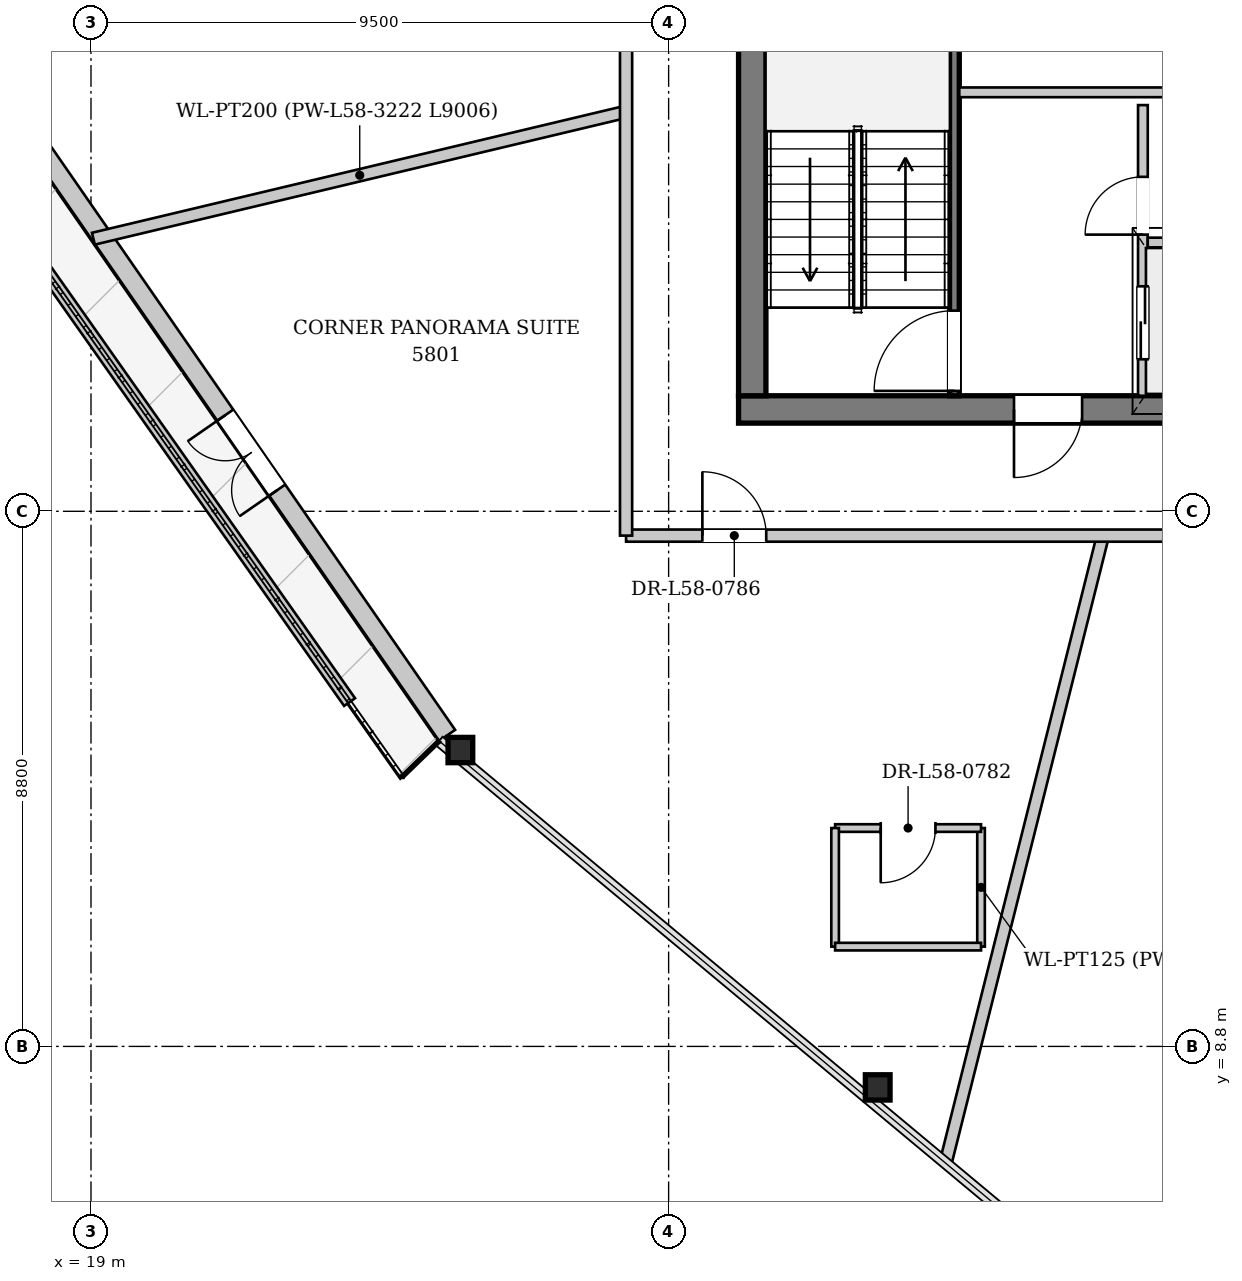
"""IFC4 building model, lengths in metres.
Left out: names, types, materials, properties, quantities, classifications, styles, units other than length and angle.
Written with IfcOpenShell. Run it as: python <this file> out.ifc"""

import sys

from ifc_helpers import new_model, si_unit, direction, frame, frame_2d, origin, origin_2d, place, context, subcontext, project, spatial, rectangle, i_section, extrude, source, transform, mapped, element, fill, save


model = new_model("IFC4")
c1 = context("Model", 3, precision=1e-05, world=origin(), true_north=direction((0.0, 1.0)))
c2 = subcontext(c1, "Body", "Model", "MODEL_VIEW")
j1 = project(units=[si_unit("LENGTHUNIT", "METRE"), si_unit("PLANEANGLEUNIT", "RADIAN")], contexts=[c1])
p1 = place(None, origin())
s1 = spatial("IfcSite", under=j1, at=p1, CompositionType="ELEMENT")
p2 = place(p1, origin())
s2 = spatial("IfcBuilding", under=s1, at=p2, CompositionType="ELEMENT")
p3 = place(p2, frame((0.0, 0.0, 220.25)))
s3 = spatial("IfcBuildingStorey", under=s2, at=p3, CompositionType="ELEMENT", Elevation=220.25)
m1 = source(origin(), c2, "Body", "SweptSolid", [
    extrude(i_section(OverallWidth=0.406, OverallDepth=0.416, WebThickness=0.027, FlangeThickness=0.042, at=origin_2d()), origin(), (0.0, 0.0, 1.0), 3.469),
])
p4 = place(p3, frame((24.726, 13.823, 0.0), z_axis=(0.201474528412, -0.086064739172, 0.975705321843), x_axis=(0.392833572911, 0.919609582374, 0.0)))
e1 = element("IfcColumn", 1, at=p4, inside=s3, PredefinedType="COLUMN", context=c2, shape_type="MappedRepresentation", body=[
    mapped(m1, transform((0.0, 0.0, 0.0), x_axis=(1.0, 0.0, 0.0), y_axis=(0.0, 1.0, 0.0), z_axis=(0.0, 0.0, 1.0), scale=1.0)),
])
m2 = source(origin(), c2, "Body", "SweptSolid", [
    extrude(i_section(OverallWidth=0.406, OverallDepth=0.416, WebThickness=0.027, FlangeThickness=0.042, at=origin_2d()), origin(), (0.0, 0.0, 1.0), 3.49),
])
p5 = place(p3, frame((31.515, 8.164, 0.0), z_axis=(0.242527231029, -0.021825352201, 0.96989906496), x_axis=(0.089629150551, 0.995975208211, 0.0)))
e2 = element("IfcColumn", 2, at=p5, inside=s3, PredefinedType="COLUMN", context=c2, shape_type="MappedRepresentation", body=[
    mapped(m2, transform((0.0, 0.0, 0.0), x_axis=(1.0, 0.0, 0.0), y_axis=(0.0, 1.0, 0.0), z_axis=(0.0, 0.0, 1.0), scale=1.0)),
])
p6 = place(p3, frame((24.857, 13.914, 0.0), z_axis=(0.0, 0.0, 1.0), x_axis=(-0.569497917595, 0.821992774819, 0.0)))
e3 = element("IfcWall", 3, at=p6, inside=s3, PredefinedType="SOLIDWALL", context=c2, shape_type="SweptSolid", body=[
    extrude(rectangle(XDim=17.678, YDim=0.32, at=frame_2d((8.839, 0.0))), origin(), (0.0, 0.0, 1.0), 2.822),
])
p7 = place(p6, frame((4.907, 0.0, 0.0)))
e4 = element("IfcOpeningElement", 4, at=p7, cuts=e3, PredefinedType="OPENING", context=c2, shape_type="SweptSolid", body=[
    extrude(rectangle(XDim=1.5, YDim=2.3, at=frame_2d((0.75, 1.15))), frame((0.0, 0.17, 0.0), z_axis=(0.0, -1.0, 0.0), x_axis=(1.0, 0.0, 0.0)), (0.0, 0.0, 1.0), 0.34),
])
p8 = place(p6, frame((11.782, 0.0, 0.352)))
e5 = element("IfcOpeningElement", 5, at=p8, cuts=e3, PredefinedType="OPENING", context=c2, shape_type="SweptSolid", body=[
    extrude(rectangle(XDim=2.6, YDim=2.35, at=frame_2d((1.3, 1.175))), frame((0.0, 0.17, 0.0), z_axis=(0.0, -1.0, 0.0), x_axis=(1.0, 0.0, 0.0)), (0.0, 0.0, 1.0), 0.34),
])
p9 = place(p3, frame((14.164, 27.359, 0.0), z_axis=(0.0, 0.0, 1.0), x_axis=(0.576040252734, -0.817421327854, 0.0)))
e6 = element("IfcWall", 6, at=p9, inside=s3, PredefinedType="PARAPET", context=c2, shape_type="SweptSolid", body=[
    extrude(rectangle(XDim=15.777, YDim=0.22, at=frame_2d((7.889, 0.0))), origin(), (0.0, 0.0, 1.0), 0.3),
])
p10 = place(p3, frame((46.35, 19.275, 0.0), z_axis=(0.0, 0.0, 1.0), x_axis=(-1.0, 0.0, 0.0)))
e7 = element("IfcWall", 7, at=p10, inside=s3, PredefinedType="SHEAR", context=c2, shape_type="SweptSolid", body=[
    extrude(rectangle(XDim=16.7, YDim=0.45, at=frame_2d((8.35, 0.0))), origin(), (0.0, 0.0, 1.0), 3.33),
])
p11 = place(p10, frame((4.55, 0.0, 0.0)))
e8 = element("IfcOpeningElement", 8, at=p11, cuts=e7, PredefinedType="OPENING", context=c2, shape_type="SweptSolid", body=[
    extrude(rectangle(XDim=1.12, YDim=2.25, at=frame_2d((0.56, 1.125))), frame((0.0, 0.235, 0.0), z_axis=(0.0, -1.0, 0.0), x_axis=(1.0, 0.0, 0.0)), (0.0, 0.0, 1.0), 0.47),
])
p12 = place(p10, frame((11.05, 0.0, 0.0)))
e9 = element("IfcOpeningElement", 9, at=p12, cuts=e7, PredefinedType="OPENING", context=c2, shape_type="SweptSolid", body=[
    extrude(rectangle(XDim=1.12, YDim=2.25, at=frame_2d((0.56, 1.125))), frame((0.0, 0.235, 0.0), z_axis=(0.0, -1.0, 0.0), x_axis=(1.0, 0.0, 0.0)), (0.0, 0.0, 1.0), 0.47),
])
p13 = place(p3, frame((29.875, 19.5, 0.0), z_axis=(0.0, 0.0, 1.0), x_axis=(0.0, 1.0, 0.0)))
e10 = element("IfcWall", 10, at=p13, inside=s3, PredefinedType="SHEAR", context=c2, shape_type="SweptSolid", body=[
    extrude(rectangle(XDim=14.2, YDim=0.45, at=frame_2d((7.1, 0.0))), origin(), (0.0, 0.0, 1.0), 3.33),
])
p14 = place(p13, frame((7.42, 0.0, 0.0)))
e11 = element("IfcOpeningElement", 11, at=p14, cuts=e10, PredefinedType="OPENING", context=c2, shape_type="SweptSolid", body=[
    extrude(rectangle(XDim=1.6, YDim=2.2, at=frame_2d((0.8, 1.1))), frame((0.0, 0.235, 0.0), z_axis=(0.0, -1.0, 0.0), x_axis=(1.0, 0.0, 0.0)), (0.0, 0.0, 1.0), 0.47),
])
p15 = place(p3, frame((33.2, 19.5, 0.0), z_axis=(0.0, 0.0, 1.0), x_axis=(0.0, 1.0, 0.0)))
e12 = element("IfcWall", 12, at=p15, inside=s3, PredefinedType="PARTITIONING", context=c2, shape_type="SweptSolid", body=[
    extrude(rectangle(XDim=7.46, YDim=0.16, at=frame_2d((3.73, 0.0))), origin(), (0.0, 0.0, 1.0), 3.33),
])
p16 = place(p15, frame((0.08, 0.0, 0.0)))
e13 = element("IfcOpeningElement", 13, at=p16, cuts=e12, PredefinedType="OPENING", context=c2, shape_type="SweptSolid", body=[
    extrude(rectangle(XDim=1.32, YDim=2.2, at=frame_2d((0.66, 1.1))), frame((0.0, 0.09, 0.0), z_axis=(0.0, -1.0, 0.0), x_axis=(1.0, 0.0, 0.0)), (0.0, 0.0, 1.0), 0.18),
])
p17 = place(p3, frame((36.3, 19.5, 0.0), z_axis=(0.0, 0.0, 1.0), x_axis=(0.0, 1.0, 0.0)))
e14 = element("IfcWall", 14, at=p17, inside=s3, PredefinedType="PARTITIONING", context=c2, shape_type="SweptSolid", body=[
    extrude(rectangle(XDim=4.78, YDim=0.16, at=frame_2d((2.39, 0.0))), origin(), (0.0, 0.0, 1.0), 3.33),
])
p18 = place(p17, frame((0.6, 0.0, 0.0)))
e15 = element("IfcOpeningElement", 15, at=p18, cuts=e14, PredefinedType="OPENING", context=c2, shape_type="SweptSolid", body=[
    extrude(rectangle(XDim=1.2, YDim=2.2, at=frame_2d((0.6, 1.1))), frame((0.0, 0.09, 0.0), z_axis=(0.0, -1.0, 0.0), x_axis=(1.0, 0.0, 0.0)), (0.0, 0.0, 1.0), 0.18),
])
p19 = place(p17, frame((2.65, 0.0, 0.0)))
e16 = element("IfcOpeningElement", 16, at=p19, cuts=e14, PredefinedType="OPENING", context=c2, shape_type="SweptSolid", body=[
    extrude(rectangle(XDim=0.95, YDim=2.1, at=frame_2d((0.475, 1.05))), frame((0.0, 0.09, 0.0), z_axis=(0.0, -1.0, 0.0), x_axis=(1.0, 0.0, 0.0)), (0.0, 0.0, 1.0), 0.18),
])
p20 = place(p3, frame((36.38, 22.02, 0.0), z_axis=(0.0, 0.0, 1.0), x_axis=(1.0, 0.0, 0.0)))
e17 = element("IfcWall", 17, at=p20, inside=s3, PredefinedType="PARTITIONING", context=c2, shape_type="SweptSolid", body=[
    extrude(rectangle(XDim=3.24, YDim=0.16, at=frame_2d((1.62, 0.0))), origin(), (0.0, 0.0, 1.0), 3.33),
])
p21 = place(p3, frame((33.28, 24.49, 0.0), z_axis=(0.0, 0.0, 1.0), x_axis=(1.0, 0.0, 0.0)))
e18 = element("IfcWall", 18, at=p21, inside=s3, PredefinedType="PARTITIONING", context=c2, shape_type="SweptSolid", body=[
    extrude(rectangle(XDim=9.44, YDim=0.16, at=frame_2d((4.72, 0.0))), origin(), (0.0, 0.0, 1.0), 3.33),
])
p22 = place(p3, frame((27.8, 24.17, 0.0), z_axis=(0.0, 0.0, 1.0), x_axis=(-0.972779156476, -0.231734142339, 0.0)))
e19 = element("IfcWall", 19, at=p22, inside=s3, PredefinedType="PARTITIONING", context=c2, shape_type="SweptSolid", body=[
    extrude(rectangle(XDim=9.006, YDim=0.2, at=frame_2d((4.503, 0.0))), origin(), (0.0, 0.0, 1.0), 3.33),
])
p23 = place(p3, frame((35.643, 17.2, 0.0), z_axis=(0.0, 0.0, 1.0), x_axis=(-0.243255959475, -0.969962132343, 0.0)))
e20 = element("IfcWall", 20, at=p23, inside=s3, PredefinedType="PARTITIONING", context=c2, shape_type="SweptSolid", body=[
    extrude(rectangle(XDim=10.605, YDim=0.2, at=frame_2d((5.303, 0.0))), origin(), (0.0, 0.0, 1.0), 3.33),
])
p24 = place(p3, frame((33.638, 10.441, 0.0), z_axis=(0.0, 0.0, 1.0), x_axis=(0.0, 1.0, 0.0)))
e21 = element("IfcWall", 21, at=p24, inside=s3, PredefinedType="PARTITIONING", context=c2, shape_type="SweptSolid", body=[
    extrude(rectangle(XDim=1.95, YDim=0.125, at=frame_2d((0.975, 0.0))), origin(), (0.0, 0.0, 1.0), 3.33),
])
p25 = place(p3, frame((33.638, 12.391, 0.0), z_axis=(0.0, 0.0, 1.0), x_axis=(-1.0, 0.0, 0.0)))
e22 = element("IfcWall", 22, at=p25, inside=s3, PredefinedType="PARTITIONING", context=c2, shape_type="SweptSolid", body=[
    extrude(rectangle(XDim=2.4, YDim=0.125, at=frame_2d((1.2, 0.0))), origin(), (0.0, 0.0, 1.0), 3.33),
])
p26 = place(p25, frame((0.75, 0.0, 0.0)))
e23 = element("IfcOpeningElement", 23, at=p26, cuts=e22, PredefinedType="OPENING", context=c2, shape_type="SweptSolid", body=[
    extrude(rectangle(XDim=0.9, YDim=2.1, at=frame_2d((0.45, 1.05))), frame((0.0, 0.073, 0.0), z_axis=(0.0, -1.0, 0.0), x_axis=(1.0, 0.0, 0.0)), (0.0, 0.0, 1.0), 0.145),
])
p27 = place(p3, frame((31.238, 12.391, 0.0), z_axis=(0.0, 0.0, 1.0), x_axis=(0.0, -1.0, 0.0)))
e24 = element("IfcWall", 24, at=p27, inside=s3, PredefinedType="PARTITIONING", context=c2, shape_type="SweptSolid", body=[
    extrude(rectangle(XDim=1.95, YDim=0.125, at=frame_2d((0.975, 0.0))), origin(), (0.0, 0.0, 1.0), 3.33),
])
p28 = place(p3, frame((31.238, 10.441, 0.0), z_axis=(0.0, 0.0, 1.0), x_axis=(1.0, 0.0, 0.0)))
e25 = element("IfcWall", 25, at=p28, inside=s3, PredefinedType="PARTITIONING", context=c2, shape_type="SweptSolid", body=[
    extrude(rectangle(XDim=2.4, YDim=0.125, at=frame_2d((1.2, 0.0))), origin(), (0.0, 0.0, 1.0), 3.33),
])
p29 = place(p3, frame((27.8, 17.2, 0.0), z_axis=(0.0, 0.0, 1.0), x_axis=(1.0, 0.0, 0.0)))
e26 = element("IfcWall", 26, at=p29, inside=s3, PredefinedType="PARTITIONING", context=c2, shape_type="SweptSolid", body=[
    extrude(rectangle(XDim=20.4, YDim=0.2, at=frame_2d((10.2, 0.0))), origin(), (0.0, 0.0, 1.0), 3.33),
])
p30 = place(p29, frame((1.255, 0.0, 0.0)))
e27 = element("IfcOpeningElement", 27, at=p30, cuts=e26, PredefinedType="OPENING", context=c2, shape_type="SweptSolid", body=[
    extrude(rectangle(XDim=1.05, YDim=2.2, at=frame_2d((0.525, 1.1))), frame((0.0, 0.11, 0.0), z_axis=(0.0, -1.0, 0.0), x_axis=(1.0, 0.0, 0.0)), (0.0, 0.0, 1.0), 0.22),
])
p31 = place(p29, frame((11.764, 0.0, 0.0)))
e28 = element("IfcOpeningElement", 28, at=p31, cuts=e26, PredefinedType="OPENING", context=c2, shape_type="SweptSolid", body=[
    extrude(rectangle(XDim=1.05, YDim=2.2, at=frame_2d((0.525, 1.1))), frame((0.0, 0.11, 0.0), z_axis=(0.0, -1.0, 0.0), x_axis=(1.0, 0.0, 0.0)), (0.0, 0.0, 1.0), 0.22),
])
p32 = place(p3, frame((27.8, 17.2, 0.0), z_axis=(0.0, 0.0, 1.0), x_axis=(0.0, 1.0, 0.0)))
e29 = element("IfcWall", 29, at=p32, inside=s3, PredefinedType="PARTITIONING", context=c2, shape_type="SweptSolid", body=[
    extrude(rectangle(XDim=18.8, YDim=0.2, at=frame_2d((9.4, 0.0))), origin(), (0.0, 0.0, 1.0), 3.33),
])
p33 = place(p32, frame((8.559, 0.0, 0.0)))
e30 = element("IfcOpeningElement", 30, at=p33, cuts=e29, PredefinedType="OPENING", context=c2, shape_type="SweptSolid", body=[
    extrude(rectangle(XDim=1.05, YDim=2.2, at=frame_2d((0.525, 1.1))), frame((0.0, 0.11, 0.0), z_axis=(0.0, -1.0, 0.0), x_axis=(1.0, 0.0, 0.0)), (0.0, 0.0, 1.0), 0.22),
])
m3 = source(origin(), c2, "Body", "SweptSolid", [
    extrude(rectangle(XDim=1.5, YDim=2.3, at=frame_2d((0.75, 1.15))), frame((0.0, 0.025, 0.0), z_axis=(0.0, -1.0, 0.0), x_axis=(1.0, 0.0, 0.0)), (0.0, 0.0, 1.0), 0.05),
])
p34 = place(p7, origin())
e31 = element("IfcDoor", 31, at=p34, inside=s3, OperationType="DOUBLE_DOOR_SINGLE_SWING", PredefinedType="DOOR", context=c2, shape_type="MappedRepresentation", body=[
    mapped(m3, transform((0.0, 0.0, 0.0), x_axis=(1.0, 0.0, 0.0), y_axis=(0.0, 1.0, 0.0), z_axis=(0.0, 0.0, 1.0), scale=1.0)),
])
fill(e4, e31)
m4 = source(origin(), c2, "Body", "SweptSolid", [
    extrude(rectangle(XDim=1.12, YDim=2.25, at=frame_2d((0.56, 1.125))), frame((0.0, 0.025, 0.0), z_axis=(0.0, -1.0, 0.0), x_axis=(1.0, 0.0, 0.0)), (0.0, 0.0, 1.0), 0.05),
])
p35 = place(p12, origin())
e32 = element("IfcDoor", 32, at=p35, inside=s3, OperationType="SINGLE_SWING_RIGHT", PredefinedType="DOOR", context=c2, shape_type="MappedRepresentation", body=[
    mapped(m4, transform((0.0, 0.0, 0.0), x_axis=(1.0, 0.0, 0.0), y_axis=(0.0, 1.0, 0.0), z_axis=(0.0, 0.0, 1.0), scale=1.0)),
])
fill(e9, e32)
m5 = source(origin(), c2, "Body", "SweptSolid", [
    extrude(rectangle(XDim=1.32, YDim=2.2, at=frame_2d((0.66, 1.1))), frame((0.0, 0.025, 0.0), z_axis=(0.0, -1.0, 0.0), x_axis=(1.0, 0.0, 0.0)), (0.0, 0.0, 1.0), 0.05),
])
p36 = place(p16, origin())
e33 = element("IfcDoor", 33, at=p36, inside=s3, OperationType="SINGLE_SWING_LEFT", PredefinedType="DOOR", context=c2, shape_type="MappedRepresentation", body=[
    mapped(m5, transform((0.0, 0.0, 0.0), x_axis=(1.0, 0.0, 0.0), y_axis=(0.0, 1.0, 0.0), z_axis=(0.0, 0.0, 1.0), scale=1.0)),
])
fill(e13, e33)
m6 = source(origin(), c2, "Body", "SweptSolid", [
    extrude(rectangle(XDim=1.2, YDim=2.2, at=frame_2d((0.6, 1.1))), frame((0.0, 0.025, 0.0), z_axis=(0.0, -1.0, 0.0), x_axis=(1.0, 0.0, 0.0)), (0.0, 0.0, 1.0), 0.05),
])
p37 = place(p18, origin())
e34 = element("IfcDoor", 34, at=p37, inside=s3, OperationType="DOUBLE_DOOR_SLIDING", PredefinedType="DOOR", context=c2, shape_type="MappedRepresentation", body=[
    mapped(m6, transform((0.0, 0.0, 0.0), x_axis=(1.0, 0.0, 0.0), y_axis=(0.0, 1.0, 0.0), z_axis=(0.0, 0.0, 1.0), scale=1.0)),
])
fill(e15, e34)
m7 = source(origin(), c2, "Body", "SweptSolid", [
    extrude(rectangle(XDim=0.95, YDim=2.1, at=frame_2d((0.475, 1.05))), frame((0.0, 0.025, 0.0), z_axis=(0.0, -1.0, 0.0), x_axis=(1.0, 0.0, 0.0)), (0.0, 0.0, 1.0), 0.05),
])
p38 = place(p19, origin())
e35 = element("IfcDoor", 35, at=p38, inside=s3, OperationType="SINGLE_SWING_LEFT", PredefinedType="DOOR", context=c2, shape_type="MappedRepresentation", body=[
    mapped(m7, transform((0.0, 0.0, 0.0), x_axis=(1.0, 0.0, 0.0), y_axis=(0.0, 1.0, 0.0), z_axis=(0.0, 0.0, 1.0), scale=1.0)),
])
fill(e16, e35)
m8 = source(origin(), c2, "Body", "SweptSolid", [
    extrude(rectangle(XDim=0.9, YDim=2.1, at=frame_2d((0.45, 1.05))), frame((0.0, 0.025, 0.0), z_axis=(0.0, -1.0, 0.0), x_axis=(1.0, 0.0, 0.0)), (0.0, 0.0, 1.0), 0.05),
])
p39 = place(p26, origin())
e36 = element("IfcDoor", 36, at=p39, inside=s3, OperationType="SINGLE_SWING_RIGHT", PredefinedType="DOOR", context=c2, shape_type="MappedRepresentation", body=[
    mapped(m8, transform((0.0, 0.0, 0.0), x_axis=(1.0, 0.0, 0.0), y_axis=(0.0, 1.0, 0.0), z_axis=(0.0, 0.0, 1.0), scale=1.0)),
])
fill(e23, e36)
m9 = source(origin(), c2, "Body", "SweptSolid", [
    extrude(rectangle(XDim=1.05, YDim=2.2, at=frame_2d((0.525, 1.1))), frame((0.0, 0.025, 0.0), z_axis=(0.0, -1.0, 0.0), x_axis=(1.0, 0.0, 0.0)), (0.0, 0.0, 1.0), 0.05),
])
p40 = place(p30, origin())
e37 = element("IfcDoor", 37, at=p40, inside=s3, OperationType="SINGLE_SWING_LEFT", PredefinedType="DOOR", context=c2, shape_type="MappedRepresentation", body=[
    mapped(m9, transform((0.0, 0.0, 0.0), x_axis=(1.0, 0.0, 0.0), y_axis=(0.0, 1.0, 0.0), z_axis=(0.0, 0.0, 1.0), scale=1.0)),
])
fill(e27, e37)
save(model, sys.argv[1])
